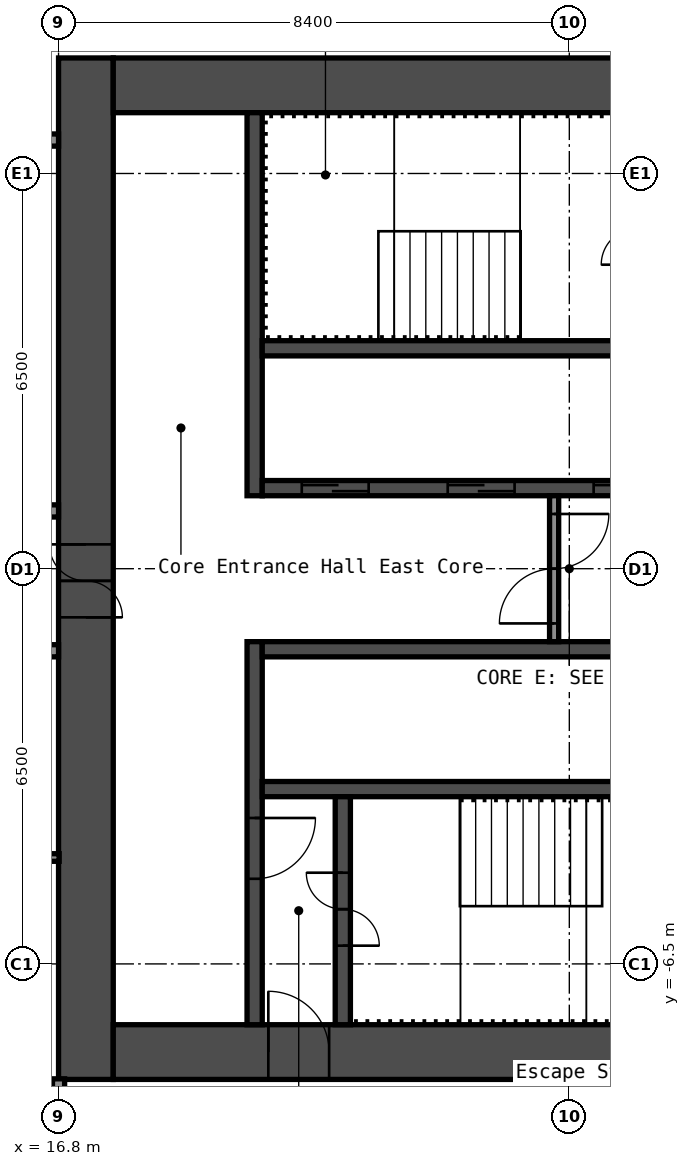
"""IFC4 building model, lengths in metres.
Left out: names, types, materials, properties, quantities, classifications, styles, units other than length and angle.
Written with IfcOpenShell. Run it as: python <this file> out.ifc"""

import sys

from ifc_helpers import new_model, si_unit, direction, frame, frame_2d, origin, place, context, subcontext, project, spatial, rectangle, extrude, element, fill, save


model = new_model("IFC4")
c1 = context("Model", 3, precision=1e-05, world=origin(), true_north=direction((0.0, 1.0)))
c2 = subcontext(c1, "Body", "Model", "MODEL_VIEW")
j1 = project(units=[si_unit("LENGTHUNIT", "METRE"), si_unit("PLANEANGLEUNIT", "RADIAN")], contexts=[c1])
p1 = place(None, origin())
s1 = spatial("IfcSite", under=j1, at=p1, CompositionType="ELEMENT")
p2 = place(p1, origin())
s2 = spatial("IfcBuilding", under=s1, at=p2, CompositionType="ELEMENT")
p3 = place(p2, frame((0.0, 0.0, 117.0)))
s3 = spatial("IfcBuildingStorey", under=s2, at=p3, CompositionType="ELEMENT", Elevation=117.0)
p4 = place(p3, frame((17.25, -8.4, 0.0), z_axis=(0.0, 0.0, 1.0), x_axis=(0.0, 1.0, 0.0)))
e1 = element("IfcWall", 1, at=p4, inside=s3, PredefinedType="SHEAR", context=c2, shape_type="SweptSolid", body=[
    extrude(rectangle(XDim=16.8, YDim=0.9, at=frame_2d((8.4, 0.0))), origin(), (0.0, 0.0, 1.0), 2.9),
])
p5 = place(p4, frame((7.6, 0.0, 0.0)))
e2 = element("IfcOpeningElement", 2, at=p5, cuts=e1, PredefinedType="OPENING", context=c2, shape_type="SweptSolid", body=[
    extrude(rectangle(XDim=1.2, YDim=2.1, at=frame_2d((0.6, 1.05))), frame((0.0, 0.46, 0.0), z_axis=(0.0, -1.0, 0.0), x_axis=(1.0, 0.0, 0.0)), (0.0, 0.0, 1.0), 0.92),
])
p6 = place(p3, frame((17.7, 7.95, 0.0), z_axis=(0.0, 0.0, 1.0), x_axis=(1.0, 0.0, 0.0)))
e3 = element("IfcWall", 3, at=p6, inside=s3, PredefinedType="SHEAR", context=c2, shape_type="SweptSolid", body=[
    extrude(rectangle(XDim=15.0, YDim=0.9, at=frame_2d((7.5, 0.0))), origin(), (0.0, 0.0, 1.0), 2.9),
])
p7 = place(p6, frame((10.4, 0.0, 0.0)))
e4 = element("IfcOpeningElement", 4, at=p7, cuts=e3, PredefinedType="OPENING", context=c2, shape_type="SweptSolid", body=[
    extrude(rectangle(XDim=1.2, YDim=2.1, at=frame_2d((0.6, 1.05))), frame((0.0, 0.46, 0.0), z_axis=(0.0, -1.0, 0.0), x_axis=(1.0, 0.0, 0.0)), (0.0, 0.0, 1.0), 0.92),
])
p8 = place(p6, frame((13.35, 0.0, 0.0)))
e5 = element("IfcOpeningElement", 5, at=p8, cuts=e3, PredefinedType="OPENING", context=c2, shape_type="SweptSolid", body=[
    extrude(rectangle(XDim=0.9, YDim=2.1, at=frame_2d((0.45, 1.05))), frame((0.0, 0.46, 0.0), z_axis=(0.0, -1.0, 0.0), x_axis=(1.0, 0.0, 0.0)), (0.0, 0.0, 1.0), 0.92),
])
p9 = place(p3, frame((17.7, -7.95, 0.0), z_axis=(0.0, 0.0, 1.0), x_axis=(1.0, 0.0, 0.0)))
e6 = element("IfcWall", 6, at=p9, inside=s3, PredefinedType="SHEAR", context=c2, shape_type="SweptSolid", body=[
    extrude(rectangle(XDim=15.0, YDim=0.9, at=frame_2d((7.5, 0.0))), origin(), (0.0, 0.0, 1.0), 2.9),
])
p10 = place(p9, frame((2.55, 0.0, 0.0)))
e7 = element("IfcOpeningElement", 7, at=p10, cuts=e6, PredefinedType="OPENING", context=c2, shape_type="SweptSolid", body=[
    extrude(rectangle(XDim=1.0, YDim=2.1, at=frame_2d((0.5, 1.05))), frame((0.0, 0.46, 0.0), z_axis=(0.0, -1.0, 0.0), x_axis=(1.0, 0.0, 0.0)), (0.0, 0.0, 1.0), 0.92),
])
p11 = place(p3, frame((20.025, 1.2, 0.0), z_axis=(0.0, 0.0, 1.0), x_axis=(0.0, 1.0, 0.0)))
e8 = element("IfcWall", 8, at=p11, inside=s3, PredefinedType="SHEAR", context=c2, shape_type="SweptSolid", body=[
    extrude(rectangle(XDim=6.3, YDim=0.25, at=frame_2d((3.15, 0.0))), origin(), (0.0, 0.0, 1.0), 2.9),
])
p12 = place(p3, frame((20.025, -7.5, 0.0), z_axis=(0.0, 0.0, 1.0), x_axis=(0.0, 1.0, 0.0)))
e9 = element("IfcWall", 9, at=p12, inside=s3, PredefinedType="SHEAR", context=c2, shape_type="SweptSolid", body=[
    extrude(rectangle(XDim=6.3, YDim=0.25, at=frame_2d((3.15, 0.0))), origin(), (0.0, 0.0, 1.0), 2.9),
])
p13 = place(p12, frame((2.4, 0.0, 0.0)))
e10 = element("IfcOpeningElement", 10, at=p13, cuts=e9, PredefinedType="OPENING", context=c2, shape_type="SweptSolid", body=[
    extrude(rectangle(XDim=1.0, YDim=2.1, at=frame_2d((0.5, 1.05))), frame((0.0, 0.135, 0.0), z_axis=(0.0, -1.0, 0.0), x_axis=(1.0, 0.0, 0.0)), (0.0, 0.0, 1.0), 0.27),
])
p14 = place(p3, frame((20.15, 1.325, 0.0), z_axis=(0.0, 0.0, 1.0), x_axis=(1.0, 0.0, 0.0)))
e11 = element("IfcWall", 11, at=p14, inside=s3, PredefinedType="SHEAR", context=c2, shape_type="SweptSolid", body=[
    extrude(rectangle(XDim=7.5, YDim=0.25, at=frame_2d((3.75, 0.0))), origin(), (0.0, 0.0, 1.0), 2.9),
])
p15 = place(p14, frame((0.65, 0.0, 0.0)))
e12 = element("IfcOpeningElement", 12, at=p15, cuts=e11, PredefinedType="OPENING", context=c2, shape_type="SweptSolid", body=[
    extrude(rectangle(XDim=1.1, YDim=2.1, at=frame_2d((0.55, 1.05))), frame((0.0, 0.135, 0.0), z_axis=(0.0, -1.0, 0.0), x_axis=(1.0, 0.0, 0.0)), (0.0, 0.0, 1.0), 0.27),
])
p16 = place(p14, frame((3.05, 0.0, 0.0)))
e13 = element("IfcOpeningElement", 13, at=p16, cuts=e11, PredefinedType="OPENING", context=c2, shape_type="SweptSolid", body=[
    extrude(rectangle(XDim=1.1, YDim=2.1, at=frame_2d((0.55, 1.05))), frame((0.0, 0.135, 0.0), z_axis=(0.0, -1.0, 0.0), x_axis=(1.0, 0.0, 0.0)), (0.0, 0.0, 1.0), 0.27),
])
p17 = place(p14, frame((5.45, 0.0, 0.0)))
e14 = element("IfcOpeningElement", 14, at=p17, cuts=e11, PredefinedType="OPENING", context=c2, shape_type="SweptSolid", body=[
    extrude(rectangle(XDim=1.1, YDim=2.1, at=frame_2d((0.55, 1.05))), frame((0.0, 0.135, 0.0), z_axis=(0.0, -1.0, 0.0), x_axis=(1.0, 0.0, 0.0)), (0.0, 0.0, 1.0), 0.27),
])
for number, where, z_axis, x_axis in (
    (15, (20.15, 3.625, 0.0), (0.0, 0.0, 1.0), (1.0, 0.0, 0.0)),
    (16, (20.15, -1.325, 0.0), (0.0, 0.0, 1.0), (1.0, 0.0, 0.0)),
    (17, (20.15, -3.625, 0.0), (0.0, 0.0, 1.0), (1.0, 0.0, 0.0)),
):
    element("IfcWall", number, at=place(p3, frame(where, z_axis=z_axis, x_axis=x_axis)), inside=s3, PredefinedType="SHEAR", context=c2, shape_type="SweptSolid", body=[
        extrude(rectangle(XDim=7.5, YDim=0.25, at=frame_2d((3.75, 0.0))), origin(), (0.0, 0.0, 1.0), 2.9),
    ])
p18 = place(p3, frame((21.475, -7.5, 0.0), z_axis=(0.0, 0.0, 1.0), x_axis=(0.0, 1.0, 0.0)))
e18 = element("IfcWall", 18, at=p18, inside=s3, PredefinedType="SHEAR", context=c2, shape_type="SweptSolid", body=[
    extrude(rectangle(XDim=3.75, YDim=0.25, at=frame_2d((1.875, 0.0))), origin(), (0.0, 0.0, 1.0), 2.9),
])
p19 = place(p18, frame((1.3, 0.0, 0.0)))
e19 = element("IfcOpeningElement", 19, at=p19, cuts=e18, PredefinedType="OPENING", context=c2, shape_type="SweptSolid", body=[
    extrude(rectangle(XDim=1.2, YDim=2.1, at=frame_2d((0.6, 1.05))), frame((0.0, 0.135, 0.0), z_axis=(0.0, -1.0, 0.0), x_axis=(1.0, 0.0, 0.0)), (0.0, 0.0, 1.0), 0.27),
])
p20 = place(p3, frame((24.95, -1.2, 0.0), z_axis=(0.0, 0.0, 1.0), x_axis=(0.0, 1.0, 0.0)))
e20 = element("IfcWall", 20, at=p20, inside=s3, PredefinedType="PARTITIONING", context=c2, shape_type="SweptSolid", body=[
    extrude(rectangle(XDim=2.4, YDim=0.15, at=frame_2d((1.2, 0.0))), origin(), (0.0, 0.0, 1.0), 2.9),
])
p21 = place(p20, frame((0.3, 0.0, 0.0)))
e21 = element("IfcOpeningElement", 21, at=p21, cuts=e20, PredefinedType="OPENING", context=c2, shape_type="SweptSolid", body=[
    extrude(rectangle(XDim=1.8, YDim=2.1, at=frame_2d((0.9, 1.05))), frame((0.0, 0.085, 0.0), z_axis=(0.0, -1.0, 0.0), x_axis=(1.0, 0.0, 0.0)), (0.0, 0.0, 1.0), 0.17),
])
p22 = place(p3, frame((13.462, -4.75, 0.0), z_axis=(0.0, 0.0, 1.0), x_axis=(1.0, 0.0, 0.0)))
e22 = element("IfcWall", 22, at=p22, inside=s3, PredefinedType="PARTITIONING", context=c2, shape_type="SweptSolid", body=[
    extrude(rectangle(XDim=3.348, YDim=0.125, at=frame_2d((1.674, 0.0))), origin(), (0.0, 0.0, 1.0), 2.9),
])
p23 = place(p22, frame((1.238, 0.0, 0.0)))
e23 = element("IfcOpeningElement", 23, at=p23, cuts=e22, PredefinedType="OPENING", context=c2, shape_type="SweptSolid", body=[
    extrude(rectangle(XDim=0.8, YDim=2.1, at=frame_2d((0.4, 1.05))), frame((0.0, 0.073, 0.0), z_axis=(0.0, -1.0, 0.0), x_axis=(1.0, 0.0, 0.0)), (0.0, 0.0, 1.0), 0.145),
])
p24 = place(p3, frame((-16.8, -1.35, 0.0), z_axis=(0.0, 0.0, 1.0), x_axis=(1.0, 0.0, 0.0)))
e24 = element("IfcWall", 24, at=p24, inside=s3, PredefinedType="PARTITIONING", context=c2, shape_type="SweptSolid", body=[
    extrude(rectangle(XDim=33.6, YDim=0.2, at=frame_2d((16.8, 0.0))), origin(), (0.0, 0.0, 1.0), 2.9),
])
p25 = place(p24, frame((2.85, 0.0, 0.0)))
e25 = element("IfcOpeningElement", 25, at=p25, cuts=e24, PredefinedType="OPENING", context=c2, shape_type="SweptSolid", body=[
    extrude(rectangle(XDim=1.0, YDim=2.1, at=frame_2d((0.5, 1.05))), frame((0.0, 0.11, 0.0), z_axis=(0.0, -1.0, 0.0), x_axis=(1.0, 0.0, 0.0)), (0.0, 0.0, 1.0), 0.22),
])
p26 = place(p24, frame((4.55, 0.0, 0.0)))
e26 = element("IfcOpeningElement", 26, at=p26, cuts=e24, PredefinedType="OPENING", context=c2, shape_type="SweptSolid", body=[
    extrude(rectangle(XDim=1.0, YDim=2.1, at=frame_2d((0.5, 1.05))), frame((0.0, 0.11, 0.0), z_axis=(0.0, -1.0, 0.0), x_axis=(1.0, 0.0, 0.0)), (0.0, 0.0, 1.0), 0.22),
])
p27 = place(p24, frame((9.88, 0.0, 0.0)))
e27 = element("IfcOpeningElement", 27, at=p27, cuts=e24, PredefinedType="OPENING", context=c2, shape_type="SweptSolid", body=[
    extrude(rectangle(XDim=0.9, YDim=2.1, at=frame_2d((0.45, 1.05))), frame((0.0, 0.11, 0.0), z_axis=(0.0, -1.0, 0.0), x_axis=(1.0, 0.0, 0.0)), (0.0, 0.0, 1.0), 0.22),
])
p28 = place(p24, frame((14.08, 0.0, 0.0)))
e28 = element("IfcOpeningElement", 28, at=p28, cuts=e24, PredefinedType="OPENING", context=c2, shape_type="SweptSolid", body=[
    extrude(rectangle(XDim=0.9, YDim=2.1, at=frame_2d((0.45, 1.05))), frame((0.0, 0.11, 0.0), z_axis=(0.0, -1.0, 0.0), x_axis=(1.0, 0.0, 0.0)), (0.0, 0.0, 1.0), 0.22),
])
p29 = place(p24, frame((19.65, 0.0, 0.0)))
e29 = element("IfcOpeningElement", 29, at=p29, cuts=e24, PredefinedType="OPENING", context=c2, shape_type="SweptSolid", body=[
    extrude(rectangle(XDim=1.0, YDim=2.1, at=frame_2d((0.5, 1.05))), frame((0.0, 0.11, 0.0), z_axis=(0.0, -1.0, 0.0), x_axis=(1.0, 0.0, 0.0)), (0.0, 0.0, 1.0), 0.22),
])
p30 = place(p24, frame((21.35, 0.0, 0.0)))
e30 = element("IfcOpeningElement", 30, at=p30, cuts=e24, PredefinedType="OPENING", context=c2, shape_type="SweptSolid", body=[
    extrude(rectangle(XDim=1.0, YDim=2.1, at=frame_2d((0.5, 1.05))), frame((0.0, 0.11, 0.0), z_axis=(0.0, -1.0, 0.0), x_axis=(1.0, 0.0, 0.0)), (0.0, 0.0, 1.0), 0.22),
])
p31 = place(p24, frame((27.2, 0.0, 0.0)))
e31 = element("IfcOpeningElement", 31, at=p31, cuts=e24, PredefinedType="OPENING", context=c2, shape_type="SweptSolid", body=[
    extrude(rectangle(XDim=1.0, YDim=2.1, at=frame_2d((0.5, 1.05))), frame((0.0, 0.11, 0.0), z_axis=(0.0, -1.0, 0.0), x_axis=(1.0, 0.0, 0.0)), (0.0, 0.0, 1.0), 0.22),
])
p32 = place(p3, frame((-16.8, 0.95, 0.0), z_axis=(0.0, 0.0, 1.0), x_axis=(1.0, 0.0, 0.0)))
e32 = element("IfcWall", 32, at=p32, inside=s3, PredefinedType="PARTITIONING", context=c2, shape_type="SweptSolid", body=[
    extrude(rectangle(XDim=33.6, YDim=0.2, at=frame_2d((16.8, 0.0))), origin(), (0.0, 0.0, 1.0), 2.9),
])
p33 = place(p32, frame((10.47, 0.0, 0.0)))
e33 = element("IfcOpeningElement", 33, at=p33, cuts=e32, PredefinedType="OPENING", context=c2, shape_type="SweptSolid", body=[
    extrude(rectangle(XDim=0.9, YDim=2.1, at=frame_2d((0.45, 1.05))), frame((0.0, 0.11, 0.0), z_axis=(0.0, -1.0, 0.0), x_axis=(1.0, 0.0, 0.0)), (0.0, 0.0, 1.0), 0.22),
])
p34 = place(p32, frame((14.67, 0.0, 0.0)))
e34 = element("IfcOpeningElement", 34, at=p34, cuts=e32, PredefinedType="OPENING", context=c2, shape_type="SweptSolid", body=[
    extrude(rectangle(XDim=0.9, YDim=2.1, at=frame_2d((0.45, 1.05))), frame((0.0, 0.11, 0.0), z_axis=(0.0, -1.0, 0.0), x_axis=(1.0, 0.0, 0.0)), (0.0, 0.0, 1.0), 0.22),
])
p35 = place(p32, frame((26.43, 0.0, 0.0)))
e35 = element("IfcOpeningElement", 35, at=p35, cuts=e32, PredefinedType="OPENING", context=c2, shape_type="SweptSolid", body=[
    extrude(rectangle(XDim=0.9, YDim=2.1, at=frame_2d((0.45, 1.05))), frame((0.0, 0.11, 0.0), z_axis=(0.0, -1.0, 0.0), x_axis=(1.0, 0.0, 0.0)), (0.0, 0.0, 1.0), 0.22),
])
p36 = place(p32, frame((30.63, 0.0, 0.0)))
e36 = element("IfcOpeningElement", 36, at=p36, cuts=e32, PredefinedType="OPENING", context=c2, shape_type="SweptSolid", body=[
    extrude(rectangle(XDim=0.9, YDim=2.1, at=frame_2d((0.45, 1.05))), frame((0.0, 0.11, 0.0), z_axis=(0.0, -1.0, 0.0), x_axis=(1.0, 0.0, 0.0)), (0.0, 0.0, 1.0), 0.22),
])
p37 = place(p3, frame((-16.8, 7.05, 0.0), z_axis=(0.0, 0.0, 1.0), x_axis=(1.0, 0.0, 0.0)))
e37 = element("IfcWall", 37, at=p37, inside=s3, PredefinedType="PARTITIONING", context=c2, shape_type="SweptSolid", body=[
    extrude(rectangle(XDim=33.6, YDim=0.2, at=frame_2d((16.8, 0.0))), origin(), (0.0, 0.0, 1.0), 2.9),
])
p38 = place(p37, frame((1.315, 0.0, 0.0)))
e38 = element("IfcOpeningElement", 38, at=p38, cuts=e37, PredefinedType="OPENING", context=c2, shape_type="SweptSolid", body=[
    extrude(rectangle(XDim=0.9, YDim=2.1, at=frame_2d((0.45, 1.05))), frame((0.0, 0.11, 0.0), z_axis=(0.0, -1.0, 0.0), x_axis=(1.0, 0.0, 0.0)), (0.0, 0.0, 1.0), 0.22),
])
p39 = place(p37, frame((5.515, 0.0, 0.0)))
e39 = element("IfcOpeningElement", 39, at=p39, cuts=e37, PredefinedType="OPENING", context=c2, shape_type="SweptSolid", body=[
    extrude(rectangle(XDim=0.9, YDim=2.1, at=frame_2d((0.45, 1.05))), frame((0.0, 0.11, 0.0), z_axis=(0.0, -1.0, 0.0), x_axis=(1.0, 0.0, 0.0)), (0.0, 0.0, 1.0), 0.22),
])
p40 = place(p37, frame((18.955, 0.0, 0.0)))
e40 = element("IfcOpeningElement", 40, at=p40, cuts=e37, PredefinedType="OPENING", context=c2, shape_type="SweptSolid", body=[
    extrude(rectangle(XDim=0.9, YDim=2.1, at=frame_2d((0.45, 1.05))), frame((0.0, 0.11, 0.0), z_axis=(0.0, -1.0, 0.0), x_axis=(1.0, 0.0, 0.0)), (0.0, 0.0, 1.0), 0.22),
])
p41 = place(p37, frame((23.155, 0.0, 0.0)))
e41 = element("IfcOpeningElement", 41, at=p41, cuts=e37, PredefinedType="OPENING", context=c2, shape_type="SweptSolid", body=[
    extrude(rectangle(XDim=0.9, YDim=2.1, at=frame_2d((0.45, 1.05))), frame((0.0, 0.11, 0.0), z_axis=(0.0, -1.0, 0.0), x_axis=(1.0, 0.0, 0.0)), (0.0, 0.0, 1.0), 0.22),
])
p42 = place(p3, frame((16.8, -15.55, 0.0), z_axis=(0.0, 0.0, 1.0), x_axis=(0.0, 1.0, 0.0)))
e42 = element("IfcWall", 42, at=p42, inside=s3, PredefinedType="PARTITIONING", context=c2, shape_type="SweptSolid", body=[
    extrude(rectangle(XDim=7.16, YDim=0.2, at=frame_2d((3.58, 0.0))), origin(), (0.0, 0.0, 1.0), 2.9),
])
p43 = place(p5, origin())
e43 = element("IfcDoor", 43, at=p43, inside=s3, OperationType="DOUBLE_DOOR_SINGLE_SWING", PredefinedType="DOOR", context=c2, shape_type="SweptSolid", body=[
    extrude(rectangle(XDim=1.2, YDim=2.1, at=frame_2d((0.6, 1.05))), frame((0.0, 0.025, 0.0), z_axis=(0.0, -1.0, 0.0), x_axis=(1.0, 0.0, 0.0)), (0.0, 0.0, 1.0), 0.05),
])
fill(e2, e43)
p44 = place(p10, origin())
e44 = element("IfcDoor", 44, at=p44, inside=s3, OperationType="SINGLE_SWING_RIGHT", PredefinedType="DOOR", context=c2, shape_type="SweptSolid", body=[
    extrude(rectangle(XDim=1.0, YDim=2.1, at=frame_2d((0.5, 1.05))), frame((0.0, 0.025, 0.0), z_axis=(0.0, -1.0, 0.0), x_axis=(1.0, 0.0, 0.0)), (0.0, 0.0, 1.0), 0.05),
])
fill(e7, e44)
p45 = place(p19, origin())
e45 = element("IfcDoor", 45, at=p45, inside=s3, OperationType="DOUBLE_DOOR_SINGLE_SWING", PredefinedType="DOOR", context=c2, shape_type="SweptSolid", body=[
    extrude(rectangle(XDim=1.2, YDim=2.1, at=frame_2d((0.6, 1.05))), frame((0.0, 0.025, 0.0), z_axis=(0.0, -1.0, 0.0), x_axis=(1.0, 0.0, 0.0)), (0.0, 0.0, 1.0), 0.05),
])
fill(e19, e45)
p46 = place(p13, origin())
e46 = element("IfcDoor", 46, at=p46, inside=s3, OperationType="SINGLE_SWING_RIGHT", PredefinedType="DOOR", context=c2, shape_type="SweptSolid", body=[
    extrude(rectangle(XDim=1.0, YDim=2.1, at=frame_2d((0.5, 1.05))), frame((0.0, 0.025, 0.0), z_axis=(0.0, -1.0, 0.0), x_axis=(1.0, 0.0, 0.0)), (0.0, 0.0, 1.0), 0.05),
])
fill(e10, e46)
p47 = place(p21, origin())
e47 = element("IfcDoor", 47, at=p47, inside=s3, OperationType="DOUBLE_DOOR_SINGLE_SWING", PredefinedType="DOOR", context=c2, shape_type="SweptSolid", body=[
    extrude(rectangle(XDim=1.8, YDim=2.1, at=frame_2d((0.9, 1.05))), frame((0.0, 0.025, 0.0), z_axis=(0.0, -1.0, 0.0), x_axis=(1.0, 0.0, 0.0)), (0.0, 0.0, 1.0), 0.05),
])
fill(e21, e47)
p48 = place(p15, origin())
e48 = element("IfcDoor", 48, at=p48, inside=s3, OperationType="DOUBLE_DOOR_SLIDING", PredefinedType="DOOR", context=c2, shape_type="SweptSolid", body=[
    extrude(rectangle(XDim=1.1, YDim=2.1, at=frame_2d((0.55, 1.05))), frame((0.0, 0.025, 0.0), z_axis=(0.0, -1.0, 0.0), x_axis=(1.0, 0.0, 0.0)), (0.0, 0.0, 1.0), 0.05),
])
fill(e12, e48)
p49 = place(p16, origin())
e49 = element("IfcDoor", 49, at=p49, inside=s3, OperationType="DOUBLE_DOOR_SLIDING", PredefinedType="DOOR", context=c2, shape_type="SweptSolid", body=[
    extrude(rectangle(XDim=1.1, YDim=2.1, at=frame_2d((0.55, 1.05))), frame((0.0, 0.025, 0.0), z_axis=(0.0, -1.0, 0.0), x_axis=(1.0, 0.0, 0.0)), (0.0, 0.0, 1.0), 0.05),
])
fill(e13, e49)
p50 = place(p17, origin())
e50 = element("IfcDoor", 50, at=p50, inside=s3, OperationType="DOUBLE_DOOR_SLIDING", PredefinedType="DOOR", context=c2, shape_type="SweptSolid", body=[
    extrude(rectangle(XDim=1.1, YDim=2.1, at=frame_2d((0.55, 1.05))), frame((0.0, 0.025, 0.0), z_axis=(0.0, -1.0, 0.0), x_axis=(1.0, 0.0, 0.0)), (0.0, 0.0, 1.0), 0.05),
])
fill(e14, e50)
save(model, sys.argv[1])
